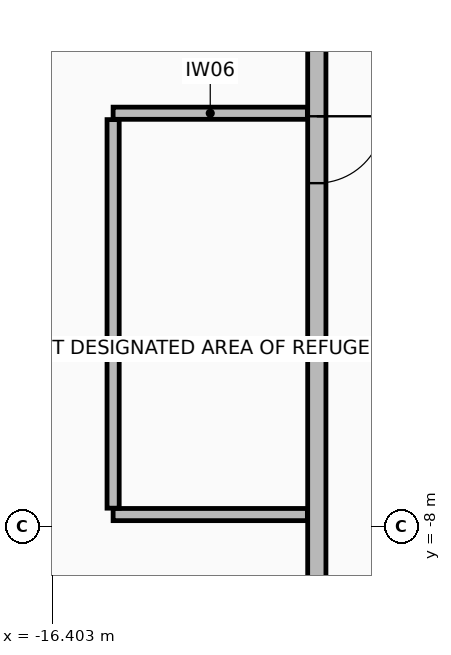
"""IFC4 building model, lengths in metres.
Left out: names, types, materials, properties, quantities, classifications, styles, units other than length and angle.
Written with IfcOpenShell. Run it as: python <this file> out.ifc"""

import sys

from ifc_helpers import new_model, si_unit, direction, frame, frame_2d, origin, place, context, subcontext, project, spatial, rectangle, extrude, element, fill, save


model = new_model("IFC4")
c1 = context("Model", 3, precision=1e-05, world=origin(), true_north=direction((0.0, 1.0)))
c2 = subcontext(c1, "Body", "Model", "MODEL_VIEW")
j1 = project(units=[si_unit("LENGTHUNIT", "METRE"), si_unit("PLANEANGLEUNIT", "RADIAN")], contexts=[c1])
p1 = place(None, origin())
s1 = spatial("IfcSite", under=j1, at=p1, CompositionType="ELEMENT")
p2 = place(p1, origin())
s2 = spatial("IfcBuilding", under=s1, at=p2, CompositionType="ELEMENT")
p3 = place(p2, frame((0.0, 0.0, 81.1)))
s3 = spatial("IfcBuildingStorey", under=s2, at=p3, CompositionType="ELEMENT", Elevation=81.1)
p4 = place(p3, frame((-12.05, 10.75, 0.0), z_axis=(0.0, 0.0, 1.0), x_axis=(0.0, -1.0, 0.0)))
e1 = element("IfcWall", 1, at=p4, inside=s3, PredefinedType="STANDARD", context=c2, shape_type="SweptSolid", body=[
    extrude(rectangle(XDim=21.5, YDim=0.3, at=frame_2d((10.75, 0.0))), origin(), (0.0, 0.0, 1.0), 3.005),
])
p5 = place(p4, frame((12.0, 0.0, 0.0)))
e2 = element("IfcOpeningElement", 2, at=p5, cuts=e1, PredefinedType="OPENING", context=c2, shape_type="SweptSolid", body=[
    extrude(rectangle(XDim=1.1, YDim=2.15, at=frame_2d((0.55, 1.075))), frame((0.0, 0.16, 0.0), z_axis=(0.0, -1.0, 0.0), x_axis=(1.0, 0.0, 0.0)), (0.0, 0.0, 1.0), 0.32),
])
for number, where, z_axis, x_axis in (
    (3, (-15.4, -1.2, 0.0), (0.0, 0.0, 1.0), (1.0, 0.0, 0.0)),
    (4, (-12.205, -7.8, 0.0), (0.0, 0.0, 1.0), (-1.0, 0.0, 0.0)),
):
    element("IfcWall", number, at=place(p3, frame(where, z_axis=z_axis, x_axis=x_axis)), inside=s3, PredefinedType="PARTITIONING", context=c2, shape_type="SweptSolid", body=[
        extrude(rectangle(XDim=3.195, YDim=0.2, at=frame_2d((1.597, 0.0))), origin(), (0.0, 0.0, 1.0), 4.405),
    ])
p6 = place(p3, frame((-15.4, -7.695, 0.0), z_axis=(0.0, 0.0, 1.0), x_axis=(0.0, 1.0, 0.0)))
e5 = element("IfcWall", 5, at=p6, inside=s3, PredefinedType="PARTITIONING", context=c2, shape_type="SweptSolid", body=[
    extrude(rectangle(XDim=6.39, YDim=0.2, at=frame_2d((3.195, 0.0))), origin(), (0.0, 0.0, 1.0), 4.405),
])
p7 = place(p5, origin())
e6 = element("IfcDoor", 6, at=p7, inside=s3, OperationType="SINGLE_SWING_LEFT", PredefinedType="DOOR", context=c2, shape_type="SweptSolid", body=[
    extrude(rectangle(XDim=1.1, YDim=2.15, at=frame_2d((0.55, 1.075))), frame((0.0, 0.025, 0.0), z_axis=(0.0, -1.0, 0.0), x_axis=(1.0, 0.0, 0.0)), (0.0, 0.0, 1.0), 0.05),
])
fill(e2, e6)
save(model, sys.argv[1])
